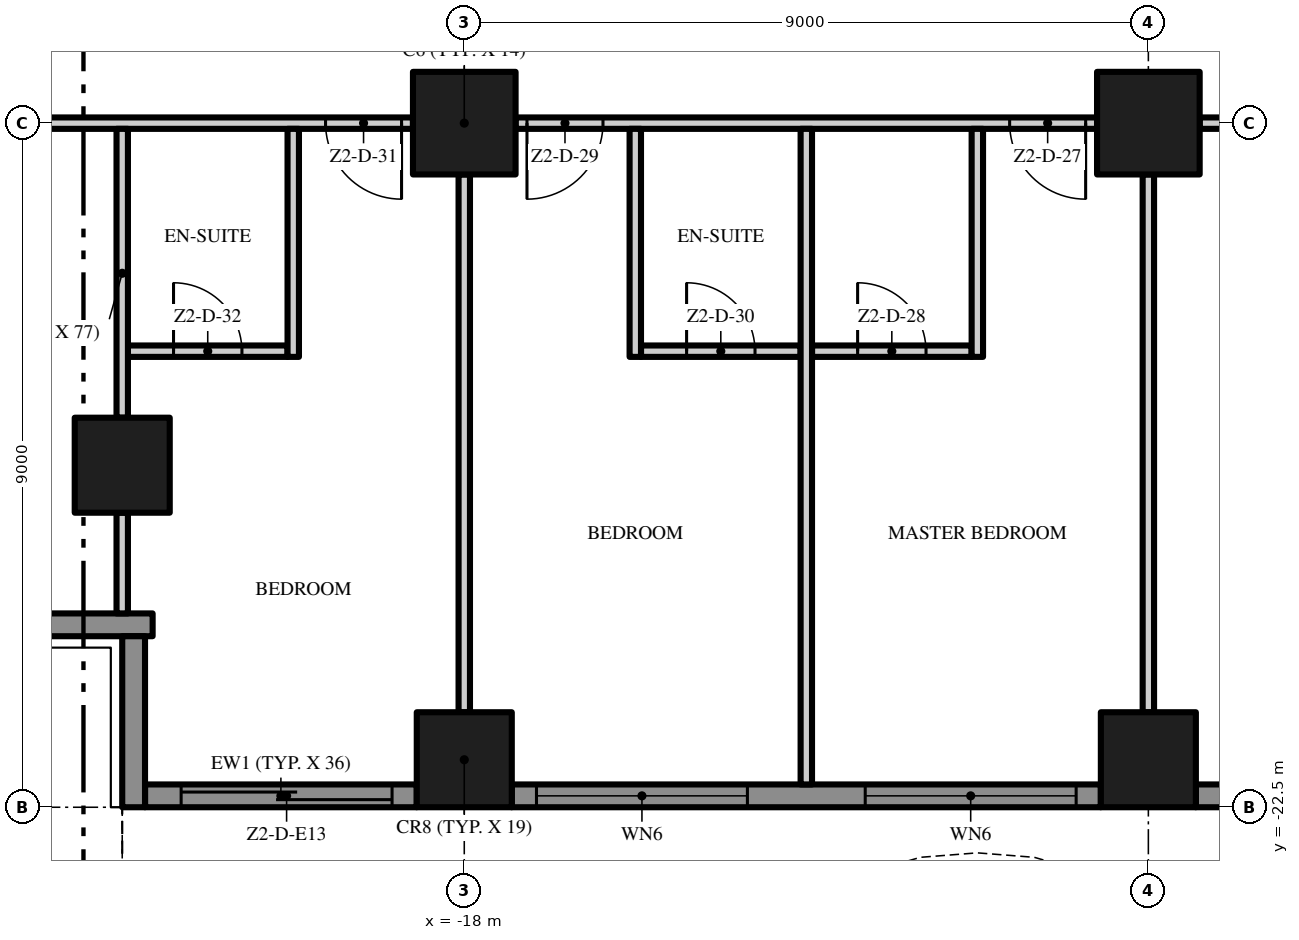
"""IFC4 building model, lengths in metres.
Left out: names, types, materials, properties, quantities, classifications, styles, units other than length and angle.
Written with IfcOpenShell. Run it as: python <this file> out.ifc"""

import sys

from ifc_helpers import new_model, si_unit, direction, frame, frame_2d, origin, origin_2d, place, context, subcontext, project, spatial, polyline, rectangle, outline, extrude, element, fill, save


model = new_model("IFC4")
c1 = context("Model", 3, precision=1e-05, world=origin(), true_north=direction((0.0, 1.0)))
c2 = subcontext(c1, "Body", "Model", "MODEL_VIEW")
j1 = project(units=[si_unit("LENGTHUNIT", "METRE"), si_unit("PLANEANGLEUNIT", "RADIAN")], contexts=[c1])
p1 = place(None, origin())
s1 = spatial("IfcSite", under=j1, at=p1, CompositionType="ELEMENT")
p2 = place(p1, origin())
s2 = spatial("IfcBuilding", under=s1, at=p2, CompositionType="ELEMENT")
p3 = place(p2, frame((0.0, 0.0, 107.4)))
s3 = spatial("IfcBuildingStorey", under=s2, at=p3, CompositionType="ELEMENT", Elevation=107.4)
p4 = place(p3, frame((-18.0, -13.5, 0.0), z_axis=(0.0, 0.0, 1.0), x_axis=(1.0, 0.0, 0.0)))
e1 = element("IfcColumn", 1, at=p4, inside=s3, PredefinedType="COLUMN", context=c2, shape_type="SweptSolid", body=[
    extrude(rectangle(XDim=1.35, YDim=1.35, at=origin_2d()), origin(), (0.0, 0.0, 1.0), 3.5),
])
for number, where, z_axis, x_axis in (
    (2, (-18.0, -21.875, 0.0), (0.0, 0.0, 1.0), (1.0, 0.0, 0.0)),
    (3, (-22.5, -18.0, 0.0), (0.0, 0.0, 1.0), (1.0, 0.0, 0.0)),
):
    element("IfcColumn", number, at=place(p3, frame(where, z_axis=z_axis, x_axis=x_axis)), inside=s3, PredefinedType="COLUMN", context=c2, shape_type="SweptSolid", body=[
        extrude(rectangle(XDim=1.25, YDim=1.25, at=origin_2d()), origin(), (0.0, 0.0, 1.0), 3.5),
    ])
p5 = place(p3, frame((-9.0, -13.5, 0.0), z_axis=(0.0, 0.0, 1.0), x_axis=(1.0, 0.0, 0.0)))
e4 = element("IfcColumn", 4, at=p5, inside=s3, PredefinedType="COLUMN", context=c2, shape_type="SweptSolid", body=[
    extrude(rectangle(XDim=1.35, YDim=1.35, at=origin_2d()), origin(), (0.0, 0.0, 1.0), 3.5),
])
p6 = place(p3, frame((-9.0, -21.875, 0.0), z_axis=(0.0, 0.0, 1.0), x_axis=(1.0, 0.0, 0.0)))
e5 = element("IfcColumn", 5, at=p6, inside=s3, PredefinedType="COLUMN", context=c2, shape_type="SweptSolid", body=[
    extrude(rectangle(XDim=1.25, YDim=1.25, at=origin_2d()), origin(), (0.0, 0.0, 1.0), 3.5),
])
p7 = place(p3, frame((-18.625, -22.35, 0.0), z_axis=(0.0, 0.0, 1.0), x_axis=(-1.0, 0.0, 0.0)))
e6 = element("IfcWall", 6, at=p7, inside=s3, PredefinedType="SOLIDWALL", context=c2, shape_type="SweptSolid", body=[
    extrude(rectangle(XDim=3.575, YDim=0.3, at=frame_2d((1.788, 0.0))), origin(), (0.0, 0.0, 1.0), 3.5),
])
p8 = place(p7, frame((0.325, 0.0, 0.0)))
e7 = element("IfcOpeningElement", 7, at=p8, cuts=e6, PredefinedType="OPENING", context=c2, shape_type="SweptSolid", body=[
    extrude(rectangle(XDim=2.775, YDim=2.4, at=frame_2d((1.387, 1.2))), frame((0.0, 0.16, 0.0), z_axis=(0.0, -1.0, 0.0), x_axis=(1.0, 0.0, 0.0)), (0.0, 0.0, 1.0), 0.32),
])
p9 = place(p3, frame((-9.625, -22.35, 0.0), z_axis=(0.0, 0.0, 1.0), x_axis=(-1.0, 0.0, 0.0)))
e8 = element("IfcWall", 8, at=p9, inside=s3, PredefinedType="SOLIDWALL", context=c2, shape_type="SweptSolid", body=[
    extrude(rectangle(XDim=7.75, YDim=0.3, at=frame_2d((3.875, 0.0))), origin(), (0.0, 0.0, 1.0), 3.5),
])
p10 = place(p9, frame((4.65, 0.0, 0.45)))
e9 = element("IfcOpeningElement", 9, at=p10, cuts=e8, PredefinedType="OPENING", context=c2, shape_type="SweptSolid", body=[
    extrude(rectangle(XDim=2.775, YDim=2.65, at=frame_2d((1.387, 1.325))), frame((0.0, 0.16, 0.0), z_axis=(0.0, -1.0, 0.0), x_axis=(1.0, 0.0, 0.0)), (0.0, 0.0, 1.0), 0.32),
])
p11 = place(p9, frame((0.325, 0.0, 0.45)))
e10 = element("IfcOpeningElement", 10, at=p11, cuts=e8, PredefinedType="OPENING", context=c2, shape_type="SweptSolid", body=[
    extrude(rectangle(XDim=2.775, YDim=2.65, at=frame_2d((1.387, 1.325))), frame((0.0, 0.16, 0.0), z_axis=(0.0, -1.0, 0.0), x_axis=(1.0, 0.0, 0.0)), (0.0, 0.0, 1.0), 0.32),
])
p12 = place(p3, frame((-0.625, -22.35, 0.0), z_axis=(0.0, 0.0, 1.0), x_axis=(-1.0, 0.0, 0.0)))
e11 = element("IfcWall", 11, at=p12, inside=s3, PredefinedType="SOLIDWALL", context=c2, shape_type="SweptSolid", body=[
    extrude(rectangle(XDim=7.75, YDim=0.3, at=frame_2d((3.875, 0.0))), origin(), (0.0, 0.0, 1.0), 3.5),
])
p13 = place(p12, frame((4.65, 0.0, 0.45)))
e12 = element("IfcOpeningElement", 12, at=p13, cuts=e11, PredefinedType="OPENING", context=c2, shape_type="SweptSolid", body=[
    extrude(rectangle(XDim=2.775, YDim=2.65, at=frame_2d((1.387, 1.325))), frame((0.0, 0.16, 0.0), z_axis=(0.0, -1.0, 0.0), x_axis=(1.0, 0.0, 0.0)), (0.0, 0.0, 1.0), 0.32),
])
p14 = place(p12, frame((0.325, 0.0, 0.0)))
e13 = element("IfcOpeningElement", 13, at=p14, cuts=e11, PredefinedType="OPENING", context=c2, shape_type="SweptSolid", body=[
    extrude(rectangle(XDim=2.775, YDim=2.4, at=frame_2d((1.387, 1.2))), frame((0.0, 0.16, 0.0), z_axis=(0.0, -1.0, 0.0), x_axis=(1.0, 0.0, 0.0)), (0.0, 0.0, 1.0), 0.32),
])
p15 = place(p3, frame((-22.1, -20.1, 0.0), z_axis=(0.0, 0.0, 1.0), x_axis=(-1.0, 0.0, 0.0)))
e14 = element("IfcWall", 14, at=p15, inside=s3, PredefinedType="SOLIDWALL", context=c2, shape_type="SweptSolid", body=[
    extrude(rectangle(XDim=2.35, YDim=0.3, at=frame_2d((1.175, 0.0))), origin(), (0.0, 0.0, 1.0), 3.5),
])
p16 = place(p3, frame((-22.35, -22.5, 0.0), z_axis=(0.0, 0.0, 1.0), x_axis=(0.0, 1.0, 0.0)))
e15 = element("IfcWall", 15, at=p16, inside=s3, PredefinedType="SOLIDWALL", context=c2, shape_type="SweptSolid", body=[
    extrude(rectangle(XDim=2.25, YDim=0.3, at=frame_2d((1.125, 0.0))), origin(), (0.0, 0.0, 1.0), 3.5),
])
p17 = place(p3, origin())
e16 = element("IfcWall", 16, at=p17, inside=s3, PredefinedType="USERDEFINED", context=c2, shape_type="SweptSolid", body=[
    extrude(outline(polyline([(-22.5, -24.3), (-21.0, -25.005), (-19.5, -25.441), (-18.75, -25.5), (-18.0, -25.441), (-16.5, -25.005), (-15.0, -24.3), (-13.5, -23.595), (-12.0, -23.159), (-11.25, -23.1), (-10.5, -23.159), (-9.0, -23.595), (-7.5, -24.3), (-6.0, -25.005), (-4.5, -25.441), (-3.75, -25.5), (-3.0, -25.441), (-1.5, -25.005), (0.0, -24.3), (1.5, -23.595), (3.0, -23.159), (3.75, -23.1), (4.5, -23.159), (6.0, -23.595), (7.5, -24.3), (9.0, -25.005), (10.5, -25.441), (11.25, -25.5), (12.0, -25.441), (13.5, -25.005), (15.0, -24.3), (16.5, -23.595), (18.0, -23.159), (18.75, -23.1), (19.5, -23.159), (21.0, -23.595), (22.5, -24.3), (22.606, -24.074), (21.089, -23.36), (19.545, -22.911), (18.75, -22.849), (17.955, -22.911), (16.411, -23.36), (14.894, -24.074), (13.411, -24.771), (11.955, -25.194), (11.25, -25.249), (10.545, -25.194), (9.089, -24.771), (7.606, -24.074), (6.089, -23.36), (4.545, -22.911), (3.75, -22.849), (2.955, -22.911), (1.411, -23.36), (-0.106, -24.074), (-1.589, -24.771), (-3.045, -25.194), (-3.75, -25.249), (-4.455, -25.194), (-5.911, -24.771), (-7.394, -24.074), (-8.911, -23.36), (-10.455, -22.911), (-11.25, -22.849), (-12.045, -22.911), (-13.589, -23.36), (-15.106, -24.074), (-16.589, -24.771), (-18.045, -25.194), (-18.75, -25.249), (-19.455, -25.194), (-20.911, -24.771), (-22.394, -24.074), (-22.5, -24.3)])), origin(), (0.0, 0.0, 1.0), 0.9),
])
p18 = place(p3, frame((-22.425, -16.5, 0.0), z_axis=(0.0, 0.0, 1.0), x_axis=(1.0, 0.0, 0.0)))
e17 = element("IfcWall", 17, at=p18, inside=s3, PredefinedType="PARTITIONING", context=c2, shape_type="SweptSolid", body=[
    extrude(rectangle(XDim=2.1, YDim=0.15, at=frame_2d((1.05, 0.0))), origin(), (0.0, 0.0, 1.0), 3.5),
])
p19 = place(p18, frame((0.6, 0.0, 0.0)))
e18 = element("IfcOpeningElement", 18, at=p19, cuts=e17, PredefinedType="OPENING", context=c2, shape_type="SweptSolid", body=[
    extrude(rectangle(XDim=0.9, YDim=2.1, at=frame_2d((0.45, 1.05))), frame((0.0, 0.085, 0.0), z_axis=(0.0, -1.0, 0.0), x_axis=(1.0, 0.0, 0.0)), (0.0, 0.0, 1.0), 0.17),
])
p20 = place(p3, frame((-15.675, -16.5, 0.0), z_axis=(0.0, 0.0, 1.0), x_axis=(1.0, 0.0, 0.0)))
e19 = element("IfcWall", 19, at=p20, inside=s3, PredefinedType="PARTITIONING", context=c2, shape_type="SweptSolid", body=[
    extrude(rectangle(XDim=2.1, YDim=0.15, at=frame_2d((1.05, 0.0))), origin(), (0.0, 0.0, 1.0), 3.5),
])
p21 = place(p20, frame((0.6, 0.0, 0.0)))
e20 = element("IfcOpeningElement", 20, at=p21, cuts=e19, PredefinedType="OPENING", context=c2, shape_type="SweptSolid", body=[
    extrude(rectangle(XDim=0.9, YDim=2.1, at=frame_2d((0.45, 1.05))), frame((0.0, 0.085, 0.0), z_axis=(0.0, -1.0, 0.0), x_axis=(1.0, 0.0, 0.0)), (0.0, 0.0, 1.0), 0.17),
])
p22 = place(p3, frame((-13.425, -16.5, 0.0), z_axis=(0.0, 0.0, 1.0), x_axis=(1.0, 0.0, 0.0)))
e21 = element("IfcWall", 21, at=p22, inside=s3, PredefinedType="PARTITIONING", context=c2, shape_type="SweptSolid", body=[
    extrude(rectangle(XDim=2.1, YDim=0.15, at=frame_2d((1.05, 0.0))), origin(), (0.0, 0.0, 1.0), 3.5),
])
p23 = place(p22, frame((0.6, 0.0, 0.0)))
e22 = element("IfcOpeningElement", 22, at=p23, cuts=e21, PredefinedType="OPENING", context=c2, shape_type="SweptSolid", body=[
    extrude(rectangle(XDim=0.9, YDim=2.1, at=frame_2d((0.45, 1.05))), frame((0.0, 0.085, 0.0), z_axis=(0.0, -1.0, 0.0), x_axis=(1.0, 0.0, 0.0)), (0.0, 0.0, 1.0), 0.17),
])
p24 = place(p3, frame((-18.675, -13.5, 0.0), z_axis=(0.0, 0.0, 1.0), x_axis=(-1.0, 0.0, 0.0)))
e23 = element("IfcWall", 23, at=p24, inside=s3, PredefinedType="PARTITIONING", context=c2, shape_type="SweptSolid", body=[
    extrude(rectangle(XDim=7.075, YDim=0.15, at=frame_2d((3.538, 0.0))), origin(), (0.0, 0.0, 1.0), 3.5),
])
p25 = place(p24, frame((0.15, 0.0, 0.0)))
e24 = element("IfcOpeningElement", 24, at=p25, cuts=e23, PredefinedType="OPENING", context=c2, shape_type="SweptSolid", body=[
    extrude(rectangle(XDim=1.0, YDim=2.4, at=frame_2d((0.5, 1.2))), frame((0.0, 0.085, 0.0), z_axis=(0.0, -1.0, 0.0), x_axis=(1.0, 0.0, 0.0)), (0.0, 0.0, 1.0), 0.17),
])
p26 = place(p24, frame((5.325, 0.0, 0.0)))
e25 = element("IfcOpeningElement", 25, at=p26, cuts=e23, PredefinedType="OPENING", context=c2, shape_type="SweptSolid", body=[
    extrude(rectangle(XDim=1.5, YDim=2.4, at=frame_2d((0.75, 1.2))), frame((0.0, 0.085, 0.0), z_axis=(0.0, -1.0, 0.0), x_axis=(1.0, 0.0, 0.0)), (0.0, 0.0, 1.0), 0.17),
])
p27 = place(p3, frame((-9.675, -13.5, 0.0), z_axis=(0.0, 0.0, 1.0), x_axis=(-1.0, 0.0, 0.0)))
e26 = element("IfcWall", 26, at=p27, inside=s3, PredefinedType="PARTITIONING", context=c2, shape_type="SweptSolid", body=[
    extrude(rectangle(XDim=7.65, YDim=0.15, at=frame_2d((3.825, 0.0))), origin(), (0.0, 0.0, 1.0), 3.5),
])
p28 = place(p27, frame((0.15, 0.0, 0.0)))
e27 = element("IfcOpeningElement", 27, at=p28, cuts=e26, PredefinedType="OPENING", context=c2, shape_type="SweptSolid", body=[
    extrude(rectangle(XDim=1.0, YDim=2.4, at=frame_2d((0.5, 1.2))), frame((0.0, 0.085, 0.0), z_axis=(0.0, -1.0, 0.0), x_axis=(1.0, 0.0, 0.0)), (0.0, 0.0, 1.0), 0.17),
])
p29 = place(p27, frame((6.5, 0.0, 0.0)))
e28 = element("IfcOpeningElement", 28, at=p29, cuts=e26, PredefinedType="OPENING", context=c2, shape_type="SweptSolid", body=[
    extrude(rectangle(XDim=1.0, YDim=2.4, at=frame_2d((0.5, 1.2))), frame((0.0, 0.085, 0.0), z_axis=(0.0, -1.0, 0.0), x_axis=(1.0, 0.0, 0.0)), (0.0, 0.0, 1.0), 0.17),
])
p30 = place(p3, frame((-0.675, -13.5, 0.0), z_axis=(0.0, 0.0, 1.0), x_axis=(-1.0, 0.0, 0.0)))
e29 = element("IfcWall", 29, at=p30, inside=s3, PredefinedType="PARTITIONING", context=c2, shape_type="SweptSolid", body=[
    extrude(rectangle(XDim=7.65, YDim=0.15, at=frame_2d((3.825, 0.0))), origin(), (0.0, 0.0, 1.0), 3.5),
])
p31 = place(p30, frame((4.05, 0.0, 0.0)))
e30 = element("IfcOpeningElement", 30, at=p31, cuts=e29, PredefinedType="OPENING", context=c2, shape_type="SweptSolid", body=[
    extrude(rectangle(XDim=1.8, YDim=2.4, at=frame_2d((0.9, 1.2))), frame((0.0, 0.085, 0.0), z_axis=(0.0, -1.0, 0.0), x_axis=(1.0, 0.0, 0.0)), (0.0, 0.0, 1.0), 0.17),
])
p32 = place(p3, frame((-22.5, -19.95, 0.0), z_axis=(0.0, 0.0, 1.0), x_axis=(0.0, 1.0, 0.0)))
e31 = element("IfcWall", 31, at=p32, inside=s3, PredefinedType="PARTITIONING", context=c2, shape_type="SweptSolid", body=[
    extrude(rectangle(XDim=1.325, YDim=0.15, at=frame_2d((0.662, 0.0))), origin(), (0.0, 0.0, 1.0), 3.5),
])
p33 = place(p3, frame((-22.5, -17.375, 0.0), z_axis=(0.0, 0.0, 1.0), x_axis=(0.0, 1.0, 0.0)))
e32 = element("IfcWall", 32, at=p33, inside=s3, PredefinedType="PARTITIONING", context=c2, shape_type="SweptSolid", body=[
    extrude(rectangle(XDim=3.8, YDim=0.15, at=frame_2d((1.9, 0.0))), origin(), (0.0, 0.0, 1.0), 3.5),
])
p34 = place(p3, frame((-20.25, -16.575, 0.0), z_axis=(0.0, 0.0, 1.0), x_axis=(0.0, 1.0, 0.0)))
e33 = element("IfcWall", 33, at=p34, inside=s3, PredefinedType="PARTITIONING", context=c2, shape_type="SweptSolid", body=[
    extrude(rectangle(XDim=3.0, YDim=0.15, at=frame_2d((1.5, 0.0))), origin(), (0.0, 0.0, 1.0), 3.5),
])
p35 = place(p3, frame((-18.0, -21.25, 0.0), z_axis=(0.0, 0.0, 1.0), x_axis=(0.0, 1.0, 0.0)))
e34 = element("IfcWall", 34, at=p35, inside=s3, PredefinedType="PARTITIONING", context=c2, shape_type="SweptSolid", body=[
    extrude(rectangle(XDim=7.075, YDim=0.15, at=frame_2d((3.538, 0.0))), origin(), (0.0, 0.0, 1.0), 3.5),
])
p36 = place(p3, frame((-15.75, -16.575, 0.0), z_axis=(0.0, 0.0, 1.0), x_axis=(0.0, 1.0, 0.0)))
e35 = element("IfcWall", 35, at=p36, inside=s3, PredefinedType="PARTITIONING", context=c2, shape_type="SweptSolid", body=[
    extrude(rectangle(XDim=3.0, YDim=0.15, at=frame_2d((1.5, 0.0))), origin(), (0.0, 0.0, 1.0), 3.5),
])
p37 = place(p3, frame((-13.5, -22.2, 0.0), z_axis=(0.0, 0.0, 1.0), x_axis=(0.0, 1.0, 0.0)))
e36 = element("IfcWall", 36, at=p37, inside=s3, PredefinedType="PARTITIONING", context=c2, shape_type="SweptSolid", body=[
    extrude(rectangle(XDim=8.625, YDim=0.15, at=frame_2d((4.312, 0.0))), origin(), (0.0, 0.0, 1.0), 3.5),
])
p38 = place(p3, frame((-11.25, -16.575, 0.0), z_axis=(0.0, 0.0, 1.0), x_axis=(0.0, 1.0, 0.0)))
e37 = element("IfcWall", 37, at=p38, inside=s3, PredefinedType="PARTITIONING", context=c2, shape_type="SweptSolid", body=[
    extrude(rectangle(XDim=3.0, YDim=0.15, at=frame_2d((1.5, 0.0))), origin(), (0.0, 0.0, 1.0), 3.5),
])
p39 = place(p3, frame((-9.0, -21.25, 0.0), z_axis=(0.0, 0.0, 1.0), x_axis=(0.0, 1.0, 0.0)))
e38 = element("IfcWall", 38, at=p39, inside=s3, PredefinedType="PARTITIONING", context=c2, shape_type="SweptSolid", body=[
    extrude(rectangle(XDim=7.075, YDim=0.15, at=frame_2d((3.538, 0.0))), origin(), (0.0, 0.0, 1.0), 3.5),
])
p40 = place(p8, origin())
e39 = element("IfcDoor", 39, at=p40, inside=s3, OperationType="SINGLE_SWING_LEFT", PredefinedType="DOOR", context=c2, shape_type="SweptSolid", body=[
    extrude(rectangle(XDim=2.775, YDim=2.4, at=frame_2d((1.387, 1.2))), frame((0.0, 0.025, 0.0), z_axis=(0.0, -1.0, 0.0), x_axis=(1.0, 0.0, 0.0)), (0.0, 0.0, 1.0), 0.05),
])
fill(e7, e39)
p41 = place(p10, origin())
e40 = element("IfcWindow", 40, at=p41, inside=s3, PartitioningType="SINGLE_PANEL", PredefinedType="WINDOW", context=c2, shape_type="SweptSolid", body=[
    extrude(rectangle(XDim=2.775, YDim=2.65, at=frame_2d((1.387, 1.325))), frame((0.0, 0.03, 0.0), z_axis=(0.0, -1.0, 0.0), x_axis=(1.0, 0.0, 0.0)), (0.0, 0.0, 1.0), 0.06),
])
fill(e9, e40)
p42 = place(p11, origin())
e41 = element("IfcWindow", 41, at=p42, inside=s3, PartitioningType="SINGLE_PANEL", PredefinedType="WINDOW", context=c2, shape_type="SweptSolid", body=[
    extrude(rectangle(XDim=2.775, YDim=2.65, at=frame_2d((1.387, 1.325))), frame((0.0, 0.03, 0.0), z_axis=(0.0, -1.0, 0.0), x_axis=(1.0, 0.0, 0.0)), (0.0, 0.0, 1.0), 0.06),
])
fill(e10, e41)
p43 = place(p28, origin())
e42 = element("IfcDoor", 42, at=p43, inside=s3, OperationType="SINGLE_SWING_LEFT", PredefinedType="DOOR", context=c2, shape_type="SweptSolid", body=[
    extrude(rectangle(XDim=1.0, YDim=2.4, at=frame_2d((0.5, 1.2))), frame((0.0, 0.025, 0.0), z_axis=(0.0, -1.0, 0.0), x_axis=(1.0, 0.0, 0.0)), (0.0, 0.0, 1.0), 0.05),
])
fill(e27, e42)
p44 = place(p23, origin())
e43 = element("IfcDoor", 43, at=p44, inside=s3, OperationType="SINGLE_SWING_LEFT", PredefinedType="DOOR", context=c2, shape_type="SweptSolid", body=[
    extrude(rectangle(XDim=0.9, YDim=2.1, at=frame_2d((0.45, 1.05))), frame((0.0, 0.025, 0.0), z_axis=(0.0, -1.0, 0.0), x_axis=(1.0, 0.0, 0.0)), (0.0, 0.0, 1.0), 0.05),
])
fill(e22, e43)
p45 = place(p29, origin())
e44 = element("IfcDoor", 44, at=p45, inside=s3, OperationType="SINGLE_SWING_RIGHT", PredefinedType="DOOR", context=c2, shape_type="SweptSolid", body=[
    extrude(rectangle(XDim=1.0, YDim=2.4, at=frame_2d((0.5, 1.2))), frame((0.0, 0.025, 0.0), z_axis=(0.0, -1.0, 0.0), x_axis=(1.0, 0.0, 0.0)), (0.0, 0.0, 1.0), 0.05),
])
fill(e28, e44)
p46 = place(p21, origin())
e45 = element("IfcDoor", 45, at=p46, inside=s3, OperationType="SINGLE_SWING_LEFT", PredefinedType="DOOR", context=c2, shape_type="SweptSolid", body=[
    extrude(rectangle(XDim=0.9, YDim=2.1, at=frame_2d((0.45, 1.05))), frame((0.0, 0.025, 0.0), z_axis=(0.0, -1.0, 0.0), x_axis=(1.0, 0.0, 0.0)), (0.0, 0.0, 1.0), 0.05),
])
fill(e20, e45)
p47 = place(p25, origin())
e46 = element("IfcDoor", 46, at=p47, inside=s3, OperationType="SINGLE_SWING_LEFT", PredefinedType="DOOR", context=c2, shape_type="SweptSolid", body=[
    extrude(rectangle(XDim=1.0, YDim=2.4, at=frame_2d((0.5, 1.2))), frame((0.0, 0.025, 0.0), z_axis=(0.0, -1.0, 0.0), x_axis=(1.0, 0.0, 0.0)), (0.0, 0.0, 1.0), 0.05),
])
fill(e24, e46)
p48 = place(p19, origin())
e47 = element("IfcDoor", 47, at=p48, inside=s3, OperationType="SINGLE_SWING_LEFT", PredefinedType="DOOR", context=c2, shape_type="SweptSolid", body=[
    extrude(rectangle(XDim=0.9, YDim=2.1, at=frame_2d((0.45, 1.05))), frame((0.0, 0.025, 0.0), z_axis=(0.0, -1.0, 0.0), x_axis=(1.0, 0.0, 0.0)), (0.0, 0.0, 1.0), 0.05),
])
fill(e18, e47)
save(model, sys.argv[1])
